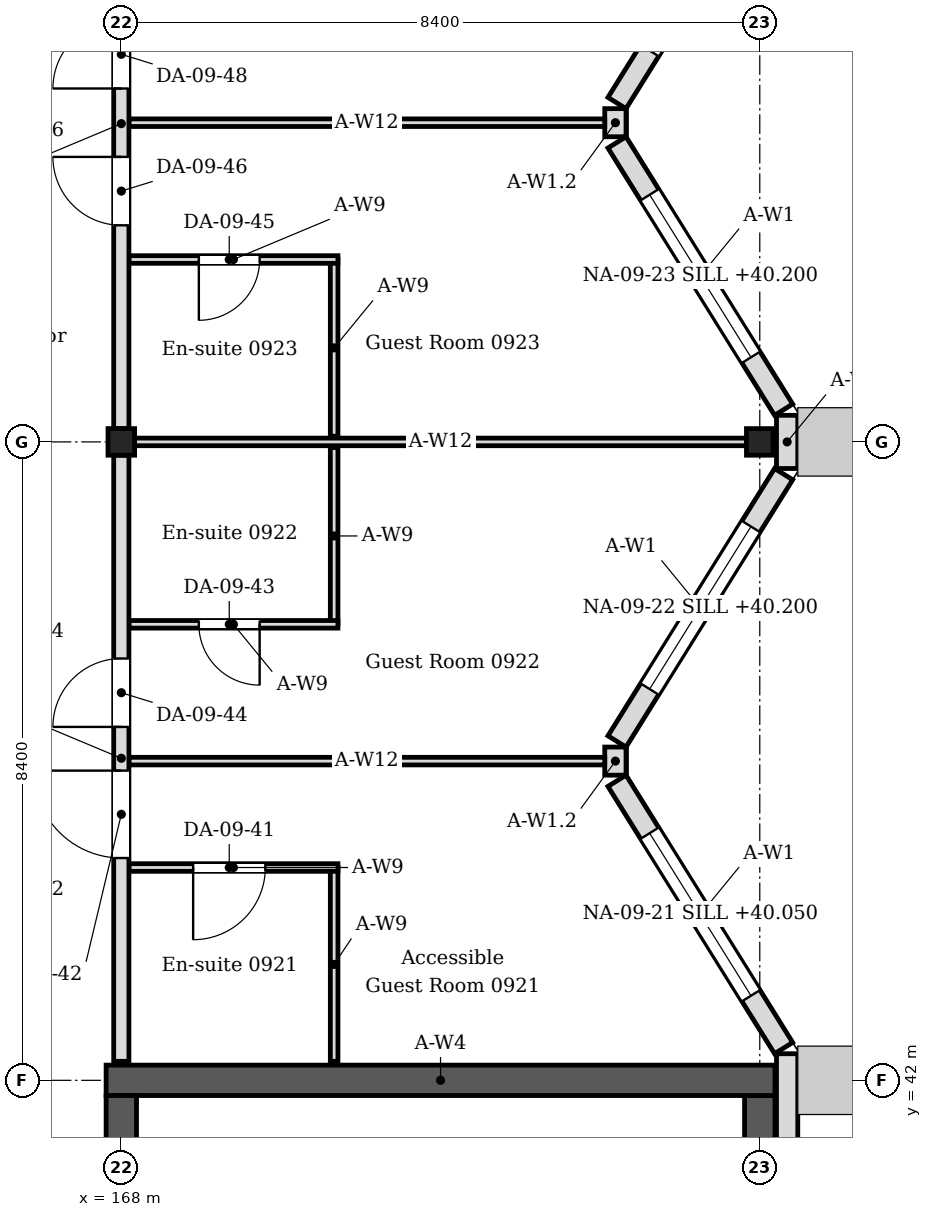
"""IFC4 building model, lengths in metres.
Left out: names, types, materials, properties, quantities, classifications, styles, units other than length and angle.
Written with IfcOpenShell. Run it as: python <this file> out.ifc"""

import sys

from ifc_helpers import new_model, si_unit, direction, frame, frame_2d, origin, origin_2d, place, context, subcontext, project, spatial, rectangle, i_section, extrude, element, fill, save


model = new_model("IFC4")
c1 = context("Model", 3, precision=1e-05, world=origin(), true_north=direction((0.0, 1.0)))
c2 = subcontext(c1, "Body", "Model", "MODEL_VIEW")
j1 = project(units=[si_unit("LENGTHUNIT", "METRE"), si_unit("PLANEANGLEUNIT", "RADIAN")], contexts=[c1])
p1 = place(None, origin())
s1 = spatial("IfcSite", under=j1, at=p1, CompositionType="ELEMENT")
p2 = place(p1, origin())
s2 = spatial("IfcBuilding", under=s1, at=p2, CompositionType="ELEMENT")
p3 = place(p2, frame((0.0, 0.0, 39.6)))
s3 = spatial("IfcBuildingStorey", under=s2, at=p3, CompositionType="ELEMENT", Elevation=39.6)
for number, where, z_axis, x_axis in (
    (1, (168.0, 50.4, 0.0), (0.0, 0.0, 1.0), (1.0, 0.0, 0.0)),
    (2, (176.4, 50.4, 0.0), (0.0, 0.0, 1.0), (1.0, 0.0, 0.0)),
):
    element("IfcColumn", number, at=place(p3, frame(where, z_axis=z_axis, x_axis=x_axis)), inside=s3, PredefinedType="COLUMN", context=c2, shape_type="SweptSolid", body=[
        extrude(i_section(OverallWidth=0.35, OverallDepth=0.35, WebThickness=0.012, FlangeThickness=0.019, FilletRadius=0.013, at=origin_2d()), origin(), (0.0, 0.0, 1.0), 4.2),
    ])
p4 = place(p3, frame((167.8, 42.0, 0.0), z_axis=(0.0, 0.0, 1.0), x_axis=(1.0, 0.0, 0.0)))
e3 = element("IfcWall", 3, at=p4, inside=s3, PredefinedType="SOLIDWALL", context=c2, shape_type="SweptSolid", body=[
    extrude(rectangle(XDim=8.8, YDim=0.4, at=frame_2d((4.4, 0.0))), origin(), (0.0, 0.0, 1.0), 4.05),
])
p5 = place(p3, frame((168.0, 25.4, 0.0), z_axis=(0.0, 0.0, 1.0), x_axis=(0.0, 1.0, 0.0)))
e4 = element("IfcWall", 4, at=p5, inside=s3, PredefinedType="SOLIDWALL", context=c2, shape_type="SweptSolid", body=[
    extrude(rectangle(XDim=16.4, YDim=0.4, at=frame_2d((8.2, 0.0))), origin(), (0.0, 0.0, 1.0), 4.05),
])
p6 = place(p5, frame((1.0, 0.0, 0.0)))
e5 = element("IfcOpeningElement", 5, at=p6, cuts=e4, PredefinedType="OPENING", context=c2, shape_type="SweptSolid", body=[
    extrude(rectangle(XDim=1.0, YDim=2.1, at=frame_2d((0.5, 1.05))), frame((0.0, 0.21, 0.0), z_axis=(0.0, -1.0, 0.0), x_axis=(1.0, 0.0, 0.0)), (0.0, 0.0, 1.0), 0.42),
])
p7 = place(p5, frame((14.4, 0.0, 0.0)))
e6 = element("IfcOpeningElement", 6, at=p7, cuts=e4, PredefinedType="OPENING", context=c2, shape_type="SweptSolid", body=[
    extrude(rectangle(XDim=1.4, YDim=2.1, at=frame_2d((0.7, 1.05))), frame((0.0, 0.21, 0.0), z_axis=(0.0, -1.0, 0.0), x_axis=(1.0, 0.0, 0.0)), (0.0, 0.0, 1.0), 0.42),
])
p8 = place(p3, frame((176.4, 25.4, 0.0), z_axis=(0.0, 0.0, 1.0), x_axis=(0.0, 1.0, 0.0)))
e7 = element("IfcWall", 7, at=p8, inside=s3, PredefinedType="SOLIDWALL", context=c2, shape_type="SweptSolid", body=[
    extrude(rectangle(XDim=16.4, YDim=0.4, at=frame_2d((8.2, 0.0))), origin(), (0.0, 0.0, 1.0), 4.05),
])
p9 = place(p3, frame((176.76, -0.22, 0.0), z_axis=(0.0, 0.0, 1.0), x_axis=(0.0, 1.0, 0.0)))
e8 = element("IfcWall", 8, at=p9, inside=s3, PredefinedType="SOLIDWALL", context=c2, shape_type="SweptSolid", body=[
    extrude(rectangle(XDim=42.57, YDim=0.28, at=frame_2d((21.285, 0.0))), origin(), (0.0, 0.0, 1.0), 4.05),
])
p10 = place(p9, frame((9.88, 0.0, 0.6)))
e9 = element("IfcOpeningElement", 9, at=p10, cuts=e8, PredefinedType="OPENING", context=c2, shape_type="SweptSolid", body=[
    extrude(rectangle(XDim=2.52, YDim=2.4, at=frame_2d((1.26, 1.2))), frame((0.0, 0.15, 0.0), z_axis=(0.0, -1.0, 0.0), x_axis=(1.0, 0.0, 0.0)), (0.0, 0.0, 1.0), 0.3),
])
p11 = place(p9, frame((14.08, 0.0, 0.6)))
e10 = element("IfcOpeningElement", 10, at=p11, cuts=e8, PredefinedType="OPENING", context=c2, shape_type="SweptSolid", body=[
    extrude(rectangle(XDim=2.52, YDim=2.4, at=frame_2d((1.26, 1.2))), frame((0.0, 0.15, 0.0), z_axis=(0.0, -1.0, 0.0), x_axis=(1.0, 0.0, 0.0)), (0.0, 0.0, 1.0), 0.3),
])
p12 = place(p9, frame((17.86, 0.0, 0.6)))
e11 = element("IfcOpeningElement", 11, at=p12, cuts=e8, PredefinedType="OPENING", context=c2, shape_type="SweptSolid", body=[
    extrude(rectangle(XDim=2.52, YDim=2.4, at=frame_2d((1.26, 1.2))), frame((0.0, 0.15, 0.0), z_axis=(0.0, -1.0, 0.0), x_axis=(1.0, 0.0, 0.0)), (0.0, 0.0, 1.0), 0.3),
])
p13 = place(p9, frame((22.06, 0.0, 0.6)))
e12 = element("IfcOpeningElement", 12, at=p13, cuts=e8, PredefinedType="OPENING", context=c2, shape_type="SweptSolid", body=[
    extrude(rectangle(XDim=2.52, YDim=2.4, at=frame_2d((1.26, 1.2))), frame((0.0, 0.15, 0.0), z_axis=(0.0, -1.0, 0.0), x_axis=(1.0, 0.0, 0.0)), (0.0, 0.0, 1.0), 0.3),
])
p14 = place(p3, frame((176.714, 42.424, 0.0), z_axis=(0.0, 0.0, 1.0), x_axis=(-0.529018946142, 0.848610013271, 0.0)))
e13 = element("IfcWall", 13, at=p14, inside=s3, PredefinedType="SOLIDWALL", context=c2, shape_type="SweptSolid", body=[
    extrude(rectangle(XDim=4.144, YDim=0.28, at=frame_2d((2.072, 0.0))), origin(), (0.0, 0.0, 1.0), 4.05),
])
p15 = place(p14, frame((0.812, 0.0, 0.45)))
e14 = element("IfcOpeningElement", 14, at=p15, cuts=e13, PredefinedType="OPENING", context=c2, shape_type="SweptSolid", body=[
    extrude(rectangle(XDim=2.52, YDim=2.1, at=frame_2d((1.26, 1.05))), frame((0.0, 0.15, 0.0), z_axis=(0.0, -1.0, 0.0), x_axis=(1.0, 0.0, 0.0)), (0.0, 0.0, 1.0), 0.3),
])
p16 = place(p3, frame((174.521, 46.459, 0.0), z_axis=(0.0, 0.0, 1.0), x_axis=(0.529018946142, 0.848610013271, 0.0)))
e15 = element("IfcWall", 15, at=p16, inside=s3, PredefinedType="SOLIDWALL", context=c2, shape_type="SweptSolid", body=[
    extrude(rectangle(XDim=4.144, YDim=0.28, at=frame_2d((2.072, 0.0))), origin(), (0.0, 0.0, 1.0), 4.05),
])
p17 = place(p16, frame((0.812, 0.0, 0.6)))
e16 = element("IfcOpeningElement", 16, at=p17, cuts=e15, PredefinedType="OPENING", context=c2, shape_type="SweptSolid", body=[
    extrude(rectangle(XDim=2.52, YDim=2.4, at=frame_2d((1.26, 1.2))), frame((0.0, 0.15, 0.0), z_axis=(0.0, -1.0, 0.0), x_axis=(1.0, 0.0, 0.0)), (0.0, 0.0, 1.0), 0.3),
])
p18 = place(p3, frame((174.5, 46.015, 0.0), z_axis=(0.0, 0.0, 1.0), x_axis=(0.0, 1.0, 0.0)))
e17 = element("IfcWall", 17, at=p18, inside=s3, PredefinedType="SOLIDWALL", context=c2, shape_type="SweptSolid", body=[
    extrude(rectangle(XDim=0.37, YDim=0.28, at=frame_2d((0.185, 0.0))), origin(), (0.0, 0.0, 1.0), 3.604),
])
p19 = place(p3, frame((176.76, 50.05, 0.0), z_axis=(0.0, 0.0, 1.0), x_axis=(0.0, 1.0, 0.0)))
e18 = element("IfcWall", 18, at=p19, inside=s3, PredefinedType="SOLIDWALL", context=c2, shape_type="SweptSolid", body=[
    extrude(rectangle(XDim=0.7, YDim=0.28, at=frame_2d((0.35, 0.0))), origin(), (0.0, 0.0, 1.0), 4.05),
])
p20 = place(p3, frame((176.714, 50.824, 0.0), z_axis=(0.0, 0.0, 1.0), x_axis=(-0.529018946142, 0.848610013271, 0.0)))
e19 = element("IfcWall", 19, at=p20, inside=s3, PredefinedType="SOLIDWALL", context=c2, shape_type="SweptSolid", body=[
    extrude(rectangle(XDim=4.144, YDim=0.28, at=frame_2d((2.072, 0.0))), origin(), (0.0, 0.0, 1.0), 4.05),
])
p21 = place(p20, frame((0.812, 0.0, 0.6)))
e20 = element("IfcOpeningElement", 20, at=p21, cuts=e19, PredefinedType="OPENING", context=c2, shape_type="SweptSolid", body=[
    extrude(rectangle(XDim=2.52, YDim=2.4, at=frame_2d((1.26, 1.2))), frame((0.0, 0.15, 0.0), z_axis=(0.0, -1.0, 0.0), x_axis=(1.0, 0.0, 0.0)), (0.0, 0.0, 1.0), 0.3),
])
p22 = place(p3, frame((174.521, 54.859, 0.0), z_axis=(0.0, 0.0, 1.0), x_axis=(0.528992500338, 0.848626498871, 0.0)))
e21 = element("IfcWall", 21, at=p22, inside=s3, PredefinedType="SOLIDWALL", context=c2, shape_type="SweptSolid", body=[
    extrude(rectangle(XDim=4.145, YDim=0.28, at=frame_2d((2.072, 0.0))), origin(), (0.0, 0.0, 1.0), 4.05),
])
p23 = place(p22, frame((0.812, 0.0, 0.6)))
e22 = element("IfcOpeningElement", 22, at=p23, cuts=e21, PredefinedType="OPENING", context=c2, shape_type="SweptSolid", body=[
    extrude(rectangle(XDim=2.52, YDim=2.4, at=frame_2d((1.26, 1.2))), frame((0.0, 0.15, 0.0), z_axis=(0.0, -1.0, 0.0), x_axis=(1.0, 0.0, 0.0)), (0.0, 0.0, 1.0), 0.3),
])
p24 = place(p3, frame((174.5, 54.415, 0.0), z_axis=(0.0, 0.0, 1.0), x_axis=(0.0, 1.0, 0.0)))
e23 = element("IfcWall", 23, at=p24, inside=s3, PredefinedType="SOLIDWALL", context=c2, shape_type="SweptSolid", body=[
    extrude(rectangle(XDim=0.37, YDim=0.28, at=frame_2d((0.185, 0.0))), origin(), (0.0, 0.0, 1.0), 3.604),
])
p25 = place(p3, frame((170.8, 42.25, 0.0), z_axis=(0.0, 0.0, 1.0), x_axis=(0.0, 1.0, 0.0)))
e24 = element("IfcWall", 24, at=p25, inside=s3, PredefinedType="PARTITIONING", context=c2, shape_type="SweptSolid", body=[
    extrude(rectangle(XDim=2.55, YDim=0.1, at=frame_2d((1.275, 0.0))), origin(), (0.0, 0.0, 1.0), 4.05),
])
p26 = place(p3, frame((170.85, 44.8, 0.0), z_axis=(0.0, 0.0, 1.0), x_axis=(-1.0, 0.0, 0.0)))
e25 = element("IfcWall", 25, at=p26, inside=s3, PredefinedType="PARTITIONING", context=c2, shape_type="SweptSolid", body=[
    extrude(rectangle(XDim=2.75, YDim=0.1, at=frame_2d((1.375, 0.0))), origin(), (0.0, 0.0, 1.0), 4.05),
])
p27 = place(p26, frame((0.955, 0.0, 0.0)))
e26 = element("IfcOpeningElement", 26, at=p27, cuts=e25, PredefinedType="OPENING", context=c2, shape_type="SweptSolid", body=[
    extrude(rectangle(XDim=0.95, YDim=2.1, at=frame_2d((0.475, 1.05))), frame((0.0, 0.06, 0.0), z_axis=(0.0, -1.0, 0.0), x_axis=(1.0, 0.0, 0.0)), (0.0, 0.0, 1.0), 0.12),
])
p28 = place(p3, frame((170.8, 48.0, 0.0), z_axis=(0.0, 0.0, 1.0), x_axis=(0.0, 1.0, 0.0)))
e27 = element("IfcWall", 27, at=p28, inside=s3, PredefinedType="PARTITIONING", context=c2, shape_type="SweptSolid", body=[
    extrude(rectangle(XDim=2.325, YDim=0.1, at=frame_2d((1.163, 0.0))), origin(), (0.0, 0.0, 1.0), 4.05),
])
p29 = place(p3, frame((170.85, 48.0, 0.0), z_axis=(0.0, 0.0, 1.0), x_axis=(-1.0, 0.0, 0.0)))
e28 = element("IfcWall", 28, at=p29, inside=s3, PredefinedType="PARTITIONING", context=c2, shape_type="SweptSolid", body=[
    extrude(rectangle(XDim=2.75, YDim=0.1, at=frame_2d((1.375, 0.0))), origin(), (0.0, 0.0, 1.0), 4.05),
])
p30 = place(p29, frame((1.03, 0.0, 0.0)))
e29 = element("IfcOpeningElement", 29, at=p30, cuts=e28, PredefinedType="OPENING", context=c2, shape_type="SweptSolid", body=[
    extrude(rectangle(XDim=0.8, YDim=2.1, at=frame_2d((0.4, 1.05))), frame((0.0, 0.06, 0.0), z_axis=(0.0, -1.0, 0.0), x_axis=(1.0, 0.0, 0.0)), (0.0, 0.0, 1.0), 0.12),
])
p31 = place(p3, frame((170.8, 50.475, 0.0), z_axis=(0.0, 0.0, 1.0), x_axis=(0.0, 1.0, 0.0)))
e30 = element("IfcWall", 30, at=p31, inside=s3, PredefinedType="PARTITIONING", context=c2, shape_type="SweptSolid", body=[
    extrude(rectangle(XDim=2.325, YDim=0.1, at=frame_2d((1.163, 0.0))), origin(), (0.0, 0.0, 1.0), 4.05),
])
p32 = place(p3, frame((170.85, 52.8, 0.0), z_axis=(0.0, 0.0, 1.0), x_axis=(-1.0, 0.0, 0.0)))
e31 = element("IfcWall", 31, at=p32, inside=s3, PredefinedType="PARTITIONING", context=c2, shape_type="SweptSolid", body=[
    extrude(rectangle(XDim=2.75, YDim=0.1, at=frame_2d((1.375, 0.0))), origin(), (0.0, 0.0, 1.0), 4.05),
])
p33 = place(p32, frame((1.03, 0.0, 0.0)))
e32 = element("IfcOpeningElement", 32, at=p33, cuts=e31, PredefinedType="OPENING", context=c2, shape_type="SweptSolid", body=[
    extrude(rectangle(XDim=0.8, YDim=2.1, at=frame_2d((0.4, 1.05))), frame((0.0, 0.06, 0.0), z_axis=(0.0, -1.0, 0.0), x_axis=(1.0, 0.0, 0.0)), (0.0, 0.0, 1.0), 0.12),
])
p34 = place(p3, frame((168.175, 50.4, 0.0), z_axis=(0.0, 0.0, 1.0), x_axis=(1.0, 0.0, 0.0)))
e33 = element("IfcWall", 33, at=p34, inside=s3, PredefinedType="PARTITIONING", context=c2, shape_type="SweptSolid", body=[
    extrude(rectangle(XDim=8.05, YDim=0.1, at=frame_2d((4.025, 0.0))), origin(), (0.0, 0.0, 1.0), 3.604),
])
for number, where, z_axis, x_axis in (
    (34, (168.1, 46.2, 0.0), (0.0, 0.0, 1.0), (1.0, 0.0, 0.0)),
    (35, (168.1, 54.6, 0.0), (0.0, 0.0, 1.0), (1.0, 0.0, 0.0)),
):
    element("IfcWall", number, at=place(p3, frame(where, z_axis=z_axis, x_axis=x_axis)), inside=s3, PredefinedType="PARTITIONING", context=c2, shape_type="SweptSolid", body=[
        extrude(rectangle(XDim=6.26, YDim=0.1, at=frame_2d((3.13, 0.0))), origin(), (0.0, 0.0, 1.0), 3.604),
    ])
p35 = place(p3, frame((168.0, 42.25, 0.0), z_axis=(0.0, 0.0, 1.0), x_axis=(0.0, 1.0, 0.0)))
e36 = element("IfcWall", 36, at=p35, inside=s3, PredefinedType="PARTITIONING", context=c2, shape_type="SweptSolid", body=[
    extrude(rectangle(XDim=7.975, YDim=0.2, at=frame_2d((3.988, 0.0))), origin(), (0.0, 0.0, 1.0), 3.45),
])
p36 = place(p35, frame((2.675, 0.0, 0.0)))
e37 = element("IfcOpeningElement", 37, at=p36, cuts=e36, PredefinedType="OPENING", context=c2, shape_type="SweptSolid", body=[
    extrude(rectangle(XDim=1.15, YDim=2.1, at=frame_2d((0.575, 1.05))), frame((0.0, 0.11, 0.0), z_axis=(0.0, -1.0, 0.0), x_axis=(1.0, 0.0, 0.0)), (0.0, 0.0, 1.0), 0.22),
])
p37 = place(p35, frame((4.4, 0.0, 0.0)))
e38 = element("IfcOpeningElement", 38, at=p37, cuts=e36, PredefinedType="OPENING", context=c2, shape_type="SweptSolid", body=[
    extrude(rectangle(XDim=0.9, YDim=2.1, at=frame_2d((0.45, 1.05))), frame((0.0, 0.11, 0.0), z_axis=(0.0, -1.0, 0.0), x_axis=(1.0, 0.0, 0.0)), (0.0, 0.0, 1.0), 0.22),
])
p38 = place(p3, frame((168.0, 50.575, 0.0), z_axis=(0.0, 0.0, 1.0), x_axis=(0.0, 1.0, 0.0)))
e39 = element("IfcWall", 39, at=p38, inside=s3, PredefinedType="PARTITIONING", context=c2, shape_type="SweptSolid", body=[
    extrude(rectangle(XDim=8.025, YDim=0.2, at=frame_2d((4.013, 0.0))), origin(), (0.0, 0.0, 1.0), 3.45),
])
p39 = place(p38, frame((2.675, 0.0, 0.0)))
e40 = element("IfcOpeningElement", 40, at=p39, cuts=e39, PredefinedType="OPENING", context=c2, shape_type="SweptSolid", body=[
    extrude(rectangle(XDim=0.9, YDim=2.1, at=frame_2d((0.45, 1.05))), frame((0.0, 0.11, 0.0), z_axis=(0.0, -1.0, 0.0), x_axis=(1.0, 0.0, 0.0)), (0.0, 0.0, 1.0), 0.22),
])
p40 = place(p38, frame((4.475, 0.0, 0.0)))
e41 = element("IfcOpeningElement", 41, at=p40, cuts=e39, PredefinedType="OPENING", context=c2, shape_type="SweptSolid", body=[
    extrude(rectangle(XDim=0.9, YDim=2.1, at=frame_2d((0.45, 1.05))), frame((0.0, 0.11, 0.0), z_axis=(0.0, -1.0, 0.0), x_axis=(1.0, 0.0, 0.0)), (0.0, 0.0, 1.0), 0.22),
])
p41 = place(p15, origin())
e42 = element("IfcWindow", 42, at=p41, inside=s3, PartitioningType="SINGLE_PANEL", PredefinedType="WINDOW", context=c2, shape_type="SweptSolid", body=[
    extrude(rectangle(XDim=2.52, YDim=2.1, at=frame_2d((1.26, 1.05))), frame((0.0, 0.03, 0.0), z_axis=(0.0, -1.0, 0.0), x_axis=(1.0, 0.0, 0.0)), (0.0, 0.0, 1.0), 0.06),
])
fill(e14, e42)
p42 = place(p17, origin())
e43 = element("IfcWindow", 43, at=p42, inside=s3, PartitioningType="SINGLE_PANEL", PredefinedType="WINDOW", context=c2, shape_type="SweptSolid", body=[
    extrude(rectangle(XDim=2.52, YDim=2.4, at=frame_2d((1.26, 1.2))), frame((0.0, 0.03, 0.0), z_axis=(0.0, -1.0, 0.0), x_axis=(1.0, 0.0, 0.0)), (0.0, 0.0, 1.0), 0.06),
])
fill(e16, e43)
p43 = place(p21, origin())
e44 = element("IfcWindow", 44, at=p43, inside=s3, PartitioningType="SINGLE_PANEL", PredefinedType="WINDOW", context=c2, shape_type="SweptSolid", body=[
    extrude(rectangle(XDim=2.52, YDim=2.4, at=frame_2d((1.26, 1.2))), frame((0.0, 0.03, 0.0), z_axis=(0.0, -1.0, 0.0), x_axis=(1.0, 0.0, 0.0)), (0.0, 0.0, 1.0), 0.06),
])
fill(e20, e44)
p44 = place(p27, origin())
e45 = element("IfcDoor", 45, at=p44, inside=s3, OperationType="SINGLE_SWING_RIGHT", PredefinedType="DOOR", context=c2, shape_type="SweptSolid", body=[
    extrude(rectangle(XDim=0.95, YDim=2.1, at=frame_2d((0.475, 1.05))), frame((0.0, 0.025, 0.0), z_axis=(0.0, -1.0, 0.0), x_axis=(1.0, 0.0, 0.0)), (0.0, 0.0, 1.0), 0.05),
])
fill(e26, e45)
p45 = place(p36, origin())
e46 = element("IfcDoor", 46, at=p45, inside=s3, OperationType="SINGLE_SWING_RIGHT", PredefinedType="DOOR", context=c2, shape_type="SweptSolid", body=[
    extrude(rectangle(XDim=1.15, YDim=2.1, at=frame_2d((0.575, 1.05))), frame((0.0, 0.025, 0.0), z_axis=(0.0, -1.0, 0.0), x_axis=(1.0, 0.0, 0.0)), (0.0, 0.0, 1.0), 0.05),
])
fill(e37, e46)
p46 = place(p30, origin())
e47 = element("IfcDoor", 47, at=p46, inside=s3, OperationType="SINGLE_SWING_LEFT", PredefinedType="DOOR", context=c2, shape_type="SweptSolid", body=[
    extrude(rectangle(XDim=0.8, YDim=2.1, at=frame_2d((0.4, 1.05))), frame((0.0, 0.025, 0.0), z_axis=(0.0, -1.0, 0.0), x_axis=(1.0, 0.0, 0.0)), (0.0, 0.0, 1.0), 0.05),
])
fill(e29, e47)
p47 = place(p37, origin())
e48 = element("IfcDoor", 48, at=p47, inside=s3, OperationType="SINGLE_SWING_LEFT", PredefinedType="DOOR", context=c2, shape_type="SweptSolid", body=[
    extrude(rectangle(XDim=0.9, YDim=2.1, at=frame_2d((0.45, 1.05))), frame((0.0, 0.025, 0.0), z_axis=(0.0, -1.0, 0.0), x_axis=(1.0, 0.0, 0.0)), (0.0, 0.0, 1.0), 0.05),
])
fill(e38, e48)
p48 = place(p33, origin())
e49 = element("IfcDoor", 49, at=p48, inside=s3, OperationType="SINGLE_SWING_RIGHT", PredefinedType="DOOR", context=c2, shape_type="SweptSolid", body=[
    extrude(rectangle(XDim=0.8, YDim=2.1, at=frame_2d((0.4, 1.05))), frame((0.0, 0.025, 0.0), z_axis=(0.0, -1.0, 0.0), x_axis=(1.0, 0.0, 0.0)), (0.0, 0.0, 1.0), 0.05),
])
fill(e32, e49)
p49 = place(p39, origin())
e50 = element("IfcDoor", 50, at=p49, inside=s3, OperationType="SINGLE_SWING_RIGHT", PredefinedType="DOOR", context=c2, shape_type="SweptSolid", body=[
    extrude(rectangle(XDim=0.9, YDim=2.1, at=frame_2d((0.45, 1.05))), frame((0.0, 0.025, 0.0), z_axis=(0.0, -1.0, 0.0), x_axis=(1.0, 0.0, 0.0)), (0.0, 0.0, 1.0), 0.05),
])
fill(e40, e50)
p50 = place(p40, origin())
e51 = element("IfcDoor", 51, at=p50, inside=s3, OperationType="SINGLE_SWING_LEFT", PredefinedType="DOOR", context=c2, shape_type="SweptSolid", body=[
    extrude(rectangle(XDim=0.9, YDim=2.1, at=frame_2d((0.45, 1.05))), frame((0.0, 0.025, 0.0), z_axis=(0.0, -1.0, 0.0), x_axis=(1.0, 0.0, 0.0)), (0.0, 0.0, 1.0), 0.05),
])
fill(e41, e51)
save(model, sys.argv[1])
